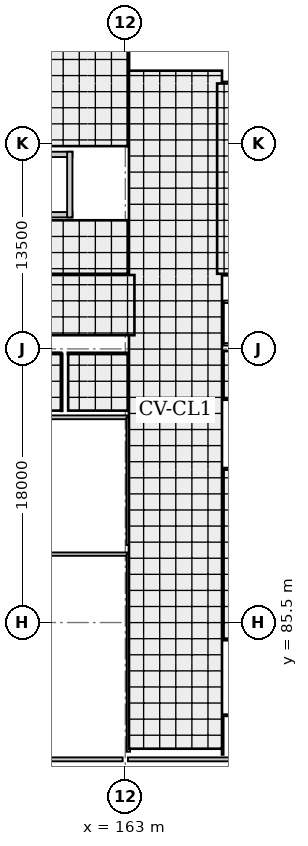
"""IFC4 building model, lengths in metres.
Left out: names, types, materials, properties, quantities, classifications, styles, units other than length and angle.
Written with IfcOpenShell. Run it as: python <this file> out.ifc"""

import sys

from ifc_helpers import new_model, si_unit, direction, frame, frame_2d, origin, origin_2d, place, context, subcontext, project, spatial, rectangle, i_section, extrude, element, fill, save


model = new_model("IFC4")
c1 = context("Model", 3, precision=1e-05, world=origin(), true_north=direction((0.0, 1.0)))
c2 = subcontext(c1, "Body", "Model", "MODEL_VIEW")
j1 = project(units=[si_unit("LENGTHUNIT", "METRE"), si_unit("PLANEANGLEUNIT", "RADIAN")], contexts=[c1])
p1 = place(None, origin())
s1 = spatial("IfcSite", under=j1, at=p1, CompositionType="ELEMENT")
p2 = place(p1, origin())
s2 = spatial("IfcBuilding", under=s1, at=p2, CompositionType="ELEMENT")
p3 = place(p2, frame((0.0, 0.0, 17.6)))
s3 = spatial("IfcBuildingStorey", under=s2, at=p3, CompositionType="ELEMENT", Elevation=17.6)
for number, where, z_axis, x_axis in (
    (1, (163.0, 76.5, 0.0), (0.0, 0.0, 1.0), (1.0, 0.0, 0.0)),
    (2, (163.0, 85.5, 0.0), (0.0, 0.0, 1.0), (1.0, 0.0, 0.0)),
    (3, (163.0, 94.5, 0.0), (0.0, 0.0, 1.0), (1.0, 0.0, 0.0)),
    (4, (163.0, 103.5, 0.0), (0.0, 0.0, 1.0), (1.0, 0.0, 0.0)),
    (5, (163.0, 117.0, 0.0), (0.0, 0.0, 1.0), (1.0, 0.0, 0.0)),
):
    element("IfcColumn", number, at=place(p3, frame(where, z_axis=z_axis, x_axis=x_axis)), inside=s3, PredefinedType="COLUMN", context=c2, shape_type="SweptSolid", body=[
        extrude(i_section(OverallWidth=0.35, OverallDepth=0.35, WebThickness=0.012, FlangeThickness=0.019, FilletRadius=0.02, at=origin_2d()), origin(), (0.0, 0.0, 1.0), 3.2),
    ])
p4 = place(p3, frame((171.825, 76.5, 0.0), z_axis=(0.0, 0.0, 1.0), x_axis=(-1.0, 0.0, 0.0)))
e6 = element("IfcWall", 6, at=p4, inside=s3, PredefinedType="SOLIDWALL", context=c2, shape_type="SweptSolid", body=[
    extrude(rectangle(XDim=8.65, YDim=0.26, at=frame_2d((4.325, 0.0))), origin(), (0.0, 0.0, 1.0), 2.505),
])
p5 = place(p4, frame((3.078, 0.0, 0.0)))
e7 = element("IfcOpeningElement", 7, at=p5, cuts=e6, PredefinedType="OPENING", context=c2, shape_type="SweptSolid", body=[
    extrude(rectangle(XDim=1.4, YDim=2.25, at=frame_2d((0.7, 1.125))), frame((0.0, 0.14, 0.0), z_axis=(0.0, -1.0, 0.0), x_axis=(1.0, 0.0, 0.0)), (0.0, 0.0, 1.0), 0.28),
])
p6 = place(p3, frame((162.825, 76.5, 0.0), z_axis=(0.0, 0.0, 1.0), x_axis=(-1.0, 0.0, 0.0)))
e8 = element("IfcWall", 8, at=p6, inside=s3, PredefinedType="SOLIDWALL", context=c2, shape_type="SweptSolid", body=[
    extrude(rectangle(XDim=8.65, YDim=0.26, at=frame_2d((4.325, 0.0))), origin(), (0.0, 0.0, 1.0), 2.505),
])
p7 = place(p6, frame((3.625, 0.0, 0.75)))
e9 = element("IfcOpeningElement", 9, at=p7, cuts=e8, PredefinedType="OPENING", context=c2, shape_type="SweptSolid", body=[
    extrude(rectangle(XDim=1.4, YDim=1.55, at=frame_2d((0.7, 0.775))), frame((0.0, 0.14, 0.0), z_axis=(0.0, -1.0, 0.0), x_axis=(1.0, 0.0, 0.0)), (0.0, 0.0, 1.0), 0.28),
])
p8 = place(p3, frame((149.025, 112.325, 0.0), z_axis=(0.0, 0.0, 1.0), x_axis=(1.0, 0.0, 0.0)))
e10 = element("IfcWall", 10, at=p8, inside=s3, PredefinedType="SHEAR", context=c2, shape_type="SweptSolid", body=[
    extrude(rectangle(XDim=10.498, YDim=0.35, at=frame_2d((5.249, 0.0))), origin(), (0.0, 0.0, 1.0), 3.02),
])
p9 = place(p8, frame((0.55, 0.0, 0.0)))
e11 = element("IfcOpeningElement", 11, at=p9, cuts=e10, PredefinedType="OPENING", context=c2, shape_type="SweptSolid", body=[
    extrude(rectangle(XDim=1.3, YDim=2.1, at=frame_2d((0.65, 1.05))), frame((0.0, 0.185, 0.0), z_axis=(0.0, -1.0, 0.0), x_axis=(1.0, 0.0, 0.0)), (0.0, 0.0, 1.0), 0.37),
])
p10 = place(p3, frame((159.522, 116.295, 0.0), z_axis=(0.0, 0.0, 1.0), x_axis=(-1.0, 0.0, 0.0)))
e12 = element("IfcWall", 12, at=p10, inside=s3, PredefinedType="SHEAR", context=c2, shape_type="SweptSolid", body=[
    extrude(rectangle(XDim=10.498, YDim=0.35, at=frame_2d((5.249, 0.0))), origin(), (0.0, 0.0, 1.0), 3.02),
])
p11 = place(p3, frame((159.347, 112.15, 0.0), z_axis=(0.0, 0.0, 1.0), x_axis=(0.0, 1.0, 0.0)))
e13 = element("IfcWall", 13, at=p11, inside=s3, PredefinedType="SHEAR", context=c2, shape_type="SweptSolid", body=[
    extrude(rectangle(XDim=4.32, YDim=0.35, at=frame_2d((2.16, 0.0))), origin(), (0.0, 0.0, 1.0), 3.02),
])
p12 = place(p3, frame((154.6, 90.0, 0.0), z_axis=(0.0, 0.0, 1.0), x_axis=(1.0, 0.0, 0.0)))
e14 = element("IfcWall", 14, at=p12, inside=s3, PredefinedType="SOLIDWALL", context=c2, shape_type="SweptSolid", body=[
    extrude(rectangle(XDim=8.6, YDim=0.22, at=frame_2d((4.3, 0.0))), origin(), (0.0, 0.0, 1.0), 2.555),
])
p13 = place(p3, frame((163.2, 90.0, 0.0), z_axis=(0.0, 0.0, 1.0), x_axis=(0.0, -1.0, 0.0)))
e15 = element("IfcWall", 15, at=p13, inside=s3, PredefinedType="SOLIDWALL", context=c2, shape_type="SweptSolid", body=[
    extrude(rectangle(XDim=13.0, YDim=0.22, at=frame_2d((6.5, 0.0))), origin(), (0.0, 0.0, 1.0), 2.505),
])
p14 = place(p13, frame((5.85, 0.0, 0.0)))
e16 = element("IfcOpeningElement", 16, at=p14, cuts=e15, PredefinedType="OPENING", context=c2, shape_type="SweptSolid", body=[
    extrude(rectangle(XDim=1.3, YDim=2.1, at=frame_2d((0.65, 1.05))), frame((0.0, 0.12, 0.0), z_axis=(0.0, -1.0, 0.0), x_axis=(1.0, 0.0, 0.0)), (0.0, 0.0, 1.0), 0.24),
])
p15 = place(p3, frame((154.6, 99.0, 0.0), z_axis=(0.0, 0.0, 1.0), x_axis=(1.0, 0.0, 0.0)))
e17 = element("IfcWall", 17, at=p15, inside=s3, PredefinedType="SOLIDWALL", context=c2, shape_type="SweptSolid", body=[
    extrude(rectangle(XDim=8.6, YDim=0.25, at=frame_2d((4.3, 0.0))), origin(), (0.0, 0.0, 1.0), 2.555),
])
p16 = place(p3, frame((163.2, 99.0, 0.0), z_axis=(0.0, 0.0, 1.0), x_axis=(0.0, -1.0, 0.0)))
e18 = element("IfcWall", 18, at=p16, inside=s3, PredefinedType="SOLIDWALL", context=c2, shape_type="SweptSolid", body=[
    extrude(rectangle(XDim=8.4, YDim=0.25, at=frame_2d((4.2, 0.0))), origin(), (0.0, 0.0, 1.0), 2.505),
])
p17 = place(p16, frame((2.55, 0.0, 0.0)))
e19 = element("IfcOpeningElement", 19, at=p17, cuts=e18, PredefinedType="OPENING", context=c2, shape_type="SweptSolid", body=[
    extrude(rectangle(XDim=1.3, YDim=2.1, at=frame_2d((0.65, 1.05))), frame((0.0, 0.135, 0.0), z_axis=(0.0, -1.0, 0.0), x_axis=(1.0, 0.0, 0.0)), (0.0, 0.0, 1.0), 0.27),
])
p18 = place(p3, frame((163.2, 125.2, 0.0), z_axis=(0.0, 0.0, 1.0), x_axis=(0.0, -1.0, 0.0)))
e20 = element("IfcWall", 20, at=p18, inside=s3, PredefinedType="PARTITIONING", context=c2, shape_type="SweptSolid", body=[
    extrude(rectangle(XDim=8.4, YDim=0.15, at=frame_2d((4.2, 0.0))), origin(), (0.0, 0.0, 1.0), 2.355),
])
p19 = place(p18, frame((3.575, 0.0, 0.0)))
e21 = element("IfcOpeningElement", 21, at=p19, cuts=e20, PredefinedType="OPENING", context=c2, shape_type="SweptSolid", body=[
    extrude(rectangle(XDim=1.25, YDim=2.1, at=frame_2d((0.625, 1.05))), frame((0.0, 0.085, 0.0), z_axis=(0.0, -1.0, 0.0), x_axis=(1.0, 0.0, 0.0)), (0.0, 0.0, 1.0), 0.17),
])
p20 = place(p3, frame((180.8, 100.2, 0.0), z_axis=(0.0, 0.0, 1.0), x_axis=(-1.0, 0.0, 0.0)))
e22 = element("IfcWall", 22, at=p20, inside=s3, PredefinedType="PARTITIONING", context=c2, shape_type="SweptSolid", body=[
    extrude(rectangle(XDim=11.4, YDim=0.14, at=frame_2d((5.7, 0.0))), origin(), (0.0, 0.0, 1.0), 2.565),
])
p21 = place(p3, frame((169.4, 100.2, 0.0), z_axis=(0.0, 0.0, 1.0), x_axis=(0.0, 1.0, 0.0)))
e23 = element("IfcWall", 23, at=p21, inside=s3, PredefinedType="PARTITIONING", context=c2, shape_type="SweptSolid", body=[
    extrude(rectangle(XDim=3.2, YDim=0.14, at=frame_2d((1.6, 0.0))), origin(), (0.0, 0.0, 1.0), 2.515),
])
p22 = place(p21, frame((1.075, 0.0, 0.0)))
e24 = element("IfcOpeningElement", 24, at=p22, cuts=e23, PredefinedType="OPENING", context=c2, shape_type="SweptSolid", body=[
    extrude(rectangle(XDim=1.05, YDim=2.1, at=frame_2d((0.525, 1.05))), frame((0.0, 0.08, 0.0), z_axis=(0.0, -1.0, 0.0), x_axis=(1.0, 0.0, 0.0)), (0.0, 0.0, 1.0), 0.16),
])
p23 = place(p3, frame((163.2, 108.4, 0.0), z_axis=(0.0, 0.0, 1.0), x_axis=(-1.0, 0.0, 0.0)))
e25 = element("IfcWall", 25, at=p23, inside=s3, PredefinedType="PARTITIONING", context=c2, shape_type="SweptSolid", body=[
    extrude(rectangle(XDim=16.6, YDim=0.11, at=frame_2d((8.3, 0.0))), origin(), (0.0, 0.0, 1.0), 2.355),
])
p24 = place(p23, frame((7.725, 0.0, 0.0)))
e26 = element("IfcOpeningElement", 26, at=p24, cuts=e25, PredefinedType="OPENING", context=c2, shape_type="SweptSolid", body=[
    extrude(rectangle(XDim=1.15, YDim=2.1, at=frame_2d((0.575, 1.05))), frame((0.0, 0.065, 0.0), z_axis=(0.0, -1.0, 0.0), x_axis=(1.0, 0.0, 0.0)), (0.0, 0.0, 1.0), 0.13),
])
p25 = place(p3, frame((163.2, 112.0, 0.0), z_axis=(0.0, 0.0, 1.0), x_axis=(0.0, -1.0, 0.0)))
e27 = element("IfcWall", 27, at=p25, inside=s3, PredefinedType="PARTITIONING", context=c2, shape_type="SweptSolid", body=[
    extrude(rectangle(XDim=3.6, YDim=0.11, at=frame_2d((1.8, 0.0))), origin(), (0.0, 0.0, 1.0), 2.355),
])
for number, where, z_axis, x_axis in (
    (28, (173.4, 84.4, 0.0), (0.0, 0.0, 1.0), (-1.0, 0.0, 0.0)),
    (29, (169.4, 95.6, 0.0), (0.0, 0.0, 1.0), (1.0, 0.0, 0.0)),
):
    element("IfcWall", number, at=place(p3, frame(where, z_axis=z_axis, x_axis=x_axis)), inside=s3, PredefinedType="PARTITIONING", context=c2, shape_type="SweptSolid", body=[
        extrude(rectangle(XDim=4.0, YDim=0.175, at=frame_2d((2.0, 0.0))), origin(), (0.0, 0.0, 1.0), 2.565),
    ])
p26 = place(p3, frame((169.4, 84.4, 0.0), z_axis=(0.0, 0.0, 1.0), x_axis=(0.0, 1.0, 0.0)))
e30 = element("IfcWall", 30, at=p26, inside=s3, PredefinedType="PARTITIONING", context=c2, shape_type="SweptSolid", body=[
    extrude(rectangle(XDim=11.2, YDim=0.175, at=frame_2d((5.6, 0.0))), origin(), (0.0, 0.0, 1.0), 2.515),
])
p27 = place(p26, frame((5.075, 0.0, 0.0)))
e31 = element("IfcOpeningElement", 31, at=p27, cuts=e30, PredefinedType="OPENING", context=c2, shape_type="SweptSolid", body=[
    extrude(rectangle(XDim=1.05, YDim=2.1, at=frame_2d((0.525, 1.05))), frame((0.0, 0.097, 0.0), z_axis=(0.0, -1.0, 0.0), x_axis=(1.0, 0.0, 0.0)), (0.0, 0.0, 1.0), 0.195),
])
for number, where, z_axis, x_axis in (
    (32, (173.4, 103.8, 0.0), (0.0, 0.0, 1.0), (-1.0, 0.0, 0.0)),
    (33, (169.4, 106.6, 0.0), (0.0, 0.0, 1.0), (1.0, 0.0, 0.0)),
):
    element("IfcWall", number, at=place(p3, frame(where, z_axis=z_axis, x_axis=x_axis)), inside=s3, PredefinedType="PARTITIONING", context=c2, shape_type="SweptSolid", body=[
        extrude(rectangle(XDim=4.0, YDim=0.16, at=frame_2d((2.0, 0.0))), origin(), (0.0, 0.0, 1.0), 2.355),
    ])
p28 = place(p3, frame((169.4, 103.8, 0.0), z_axis=(0.0, 0.0, 1.0), x_axis=(0.0, 1.0, 0.0)))
e34 = element("IfcWall", 34, at=p28, inside=s3, PredefinedType="PARTITIONING", context=c2, shape_type="SweptSolid", body=[
    extrude(rectangle(XDim=2.8, YDim=0.16, at=frame_2d((1.4, 0.0))), origin(), (0.0, 0.0, 1.0), 2.515),
])
p29 = place(p28, frame((0.875, 0.0, 0.0)))
e35 = element("IfcOpeningElement", 35, at=p29, cuts=e34, PredefinedType="OPENING", context=c2, shape_type="SweptSolid", body=[
    extrude(rectangle(XDim=1.05, YDim=2.1, at=frame_2d((0.525, 1.05))), frame((0.0, 0.09, 0.0), z_axis=(0.0, -1.0, 0.0), x_axis=(1.0, 0.0, 0.0)), (0.0, 0.0, 1.0), 0.18),
])
p30 = place(p3, frame((154.6, 103.2, 0.0), z_axis=(0.0, 0.0, 1.0), x_axis=(1.0, 0.0, 0.0)))
e36 = element("IfcWall", 36, at=p30, inside=s3, PredefinedType="PARTITIONING", context=c2, shape_type="SweptSolid", body=[
    extrude(rectangle(XDim=4.2, YDim=0.15, at=frame_2d((2.1, 0.0))), origin(), (0.0, 0.0, 1.0), 2.505),
])
p31 = place(p30, frame((1.65, 0.0, 0.0)))
e37 = element("IfcOpeningElement", 37, at=p31, cuts=e36, PredefinedType="OPENING", context=c2, shape_type="SweptSolid", body=[
    extrude(rectangle(XDim=0.9, YDim=2.1, at=frame_2d((0.45, 1.05))), frame((0.0, 0.085, 0.0), z_axis=(0.0, -1.0, 0.0), x_axis=(1.0, 0.0, 0.0)), (0.0, 0.0, 1.0), 0.17),
])
p32 = place(p3, frame((158.8, 103.2, 0.0), z_axis=(0.0, 0.0, 1.0), x_axis=(0.0, -1.0, 0.0)))
e38 = element("IfcWall", 38, at=p32, inside=s3, PredefinedType="PARTITIONING", context=c2, shape_type="SweptSolid", body=[
    extrude(rectangle(XDim=3.8, YDim=0.15, at=frame_2d((1.9, 0.0))), origin(), (0.0, 0.0, 1.0), 2.505),
])
p33 = place(p3, frame((159.2, 103.2, 0.0), z_axis=(0.0, 0.0, 1.0), x_axis=(1.0, 0.0, 0.0)))
e39 = element("IfcWall", 39, at=p33, inside=s3, PredefinedType="PARTITIONING", context=c2, shape_type="SweptSolid", body=[
    extrude(rectangle(XDim=4.0, YDim=0.14, at=frame_2d((2.0, 0.0))), origin(), (0.0, 0.0, 1.0), 2.355),
])
p34 = place(p33, frame((1.55, 0.0, 0.0)))
e40 = element("IfcOpeningElement", 40, at=p34, cuts=e39, PredefinedType="OPENING", context=c2, shape_type="SweptSolid", body=[
    extrude(rectangle(XDim=0.9, YDim=2.1, at=frame_2d((0.45, 1.05))), frame((0.0, 0.08, 0.0), z_axis=(0.0, -1.0, 0.0), x_axis=(1.0, 0.0, 0.0)), (0.0, 0.0, 1.0), 0.16),
])
p35 = place(p3, frame((163.2, 103.2, 0.0), z_axis=(0.0, 0.0, 1.0), x_axis=(0.0, -1.0, 0.0)))
e41 = element("IfcWall", 41, at=p35, inside=s3, PredefinedType="PARTITIONING", context=c2, shape_type="SweptSolid", body=[
    extrude(rectangle(XDim=3.8, YDim=0.14, at=frame_2d((1.9, 0.0))), origin(), (0.0, 0.0, 1.0), 2.355),
])
p36 = place(p3, frame((169.4, 79.4, 0.0), z_axis=(0.0, 0.0, 1.0), x_axis=(1.0, 0.0, 0.0)))
e42 = element("IfcWall", 42, at=p36, inside=s3, PredefinedType="PARTITIONING", context=c2, shape_type="SweptSolid", body=[
    extrude(rectangle(XDim=4.0, YDim=0.13, at=frame_2d((2.0, 0.0))), origin(), (0.0, 0.0, 1.0), 2.565),
])
p37 = place(p3, frame((169.4, 76.8, 0.0), z_axis=(0.0, 0.0, 1.0), x_axis=(0.0, 1.0, 0.0)))
e43 = element("IfcWall", 43, at=p37, inside=s3, PredefinedType="PARTITIONING", context=c2, shape_type="SweptSolid", body=[
    extrude(rectangle(XDim=2.6, YDim=0.13, at=frame_2d((1.3, 0.0))), origin(), (0.0, 0.0, 1.0), 2.515),
])
p38 = place(p37, frame((0.79, 0.0, 0.0)))
e44 = element("IfcOpeningElement", 44, at=p38, cuts=e43, PredefinedType="OPENING", context=c2, shape_type="SweptSolid", body=[
    extrude(rectangle(XDim=1.02, YDim=2.05, at=frame_2d((0.51, 1.025))), frame((0.0, 0.075, 0.0), z_axis=(0.0, -1.0, 0.0), x_axis=(1.0, 0.0, 0.0)), (0.0, 0.0, 1.0), 0.15),
])
p39 = place(p3, frame((173.4, 108.4, 0.0), z_axis=(0.0, 0.0, 1.0), x_axis=(-1.0, 0.0, 0.0)))
e45 = element("IfcWall", 45, at=p39, inside=s3, PredefinedType="PARTITIONING", context=c2, shape_type="SweptSolid", body=[
    extrude(rectangle(XDim=4.4, YDim=0.175, at=frame_2d((2.2, 0.0))), origin(), (0.0, 0.0, 1.0), 2.355),
])
p40 = place(p3, frame((169.0, 121.0, 0.0), z_axis=(0.0, 0.0, 1.0), x_axis=(1.0, 0.0, 0.0)))
e46 = element("IfcWall", 46, at=p40, inside=s3, PredefinedType="PARTITIONING", context=c2, shape_type="SweptSolid", body=[
    extrude(rectangle(XDim=4.4, YDim=0.175, at=frame_2d((2.2, 0.0))), origin(), (0.0, 0.0, 1.0), 2.565),
])
p41 = place(p40, frame((1.625, 0.0, 0.0)))
e47 = element("IfcOpeningElement", 47, at=p41, cuts=e46, PredefinedType="OPENING", context=c2, shape_type="SweptSolid", body=[
    extrude(rectangle(XDim=1.15, YDim=2.1, at=frame_2d((0.575, 1.05))), frame((0.0, 0.097, 0.0), z_axis=(0.0, -1.0, 0.0), x_axis=(1.0, 0.0, 0.0)), (0.0, 0.0, 1.0), 0.195),
])
p42 = place(p3, frame((169.0, 108.4, 0.0), z_axis=(0.0, 0.0, 1.0), x_axis=(0.0, 1.0, 0.0)))
e48 = element("IfcWall", 48, at=p42, inside=s3, PredefinedType="PARTITIONING", context=c2, shape_type="SweptSolid", body=[
    extrude(rectangle(XDim=12.6, YDim=0.175, at=frame_2d((6.3, 0.0))), origin(), (0.0, 0.0, 1.0), 2.515),
])
p43 = place(p5, origin())
e49 = element("IfcDoor", 49, at=p43, inside=s3, OperationType="SINGLE_SWING_RIGHT", PredefinedType="DOOR", context=c2, shape_type="SweptSolid", body=[
    extrude(rectangle(XDim=1.4, YDim=2.25, at=frame_2d((0.7, 1.125))), frame((0.0, 0.025, 0.0), z_axis=(0.0, -1.0, 0.0), x_axis=(1.0, 0.0, 0.0)), (0.0, 0.0, 1.0), 0.05),
])
fill(e7, e49)
p44 = place(p7, origin())
e50 = element("IfcWindow", 50, at=p44, inside=s3, PartitioningType="SINGLE_PANEL", PredefinedType="WINDOW", context=c2, shape_type="SweptSolid", body=[
    extrude(rectangle(XDim=1.4, YDim=1.55, at=frame_2d((0.7, 0.775))), frame((0.0, 0.03, 0.0), z_axis=(0.0, -1.0, 0.0), x_axis=(1.0, 0.0, 0.0)), (0.0, 0.0, 1.0), 0.06),
])
fill(e9, e50)
p45 = place(p14, origin())
e51 = element("IfcDoor", 51, at=p45, inside=s3, OperationType="SINGLE_SWING_LEFT", PredefinedType="DOOR", context=c2, shape_type="SweptSolid", body=[
    extrude(rectangle(XDim=1.3, YDim=2.1, at=frame_2d((0.65, 1.05))), frame((0.0, 0.025, 0.0), z_axis=(0.0, -1.0, 0.0), x_axis=(1.0, 0.0, 0.0)), (0.0, 0.0, 1.0), 0.05),
])
fill(e16, e51)
p46 = place(p17, origin())
e52 = element("IfcDoor", 52, at=p46, inside=s3, OperationType="SINGLE_SWING_RIGHT", PredefinedType="DOOR", context=c2, shape_type="SweptSolid", body=[
    extrude(rectangle(XDim=1.3, YDim=2.1, at=frame_2d((0.65, 1.05))), frame((0.0, 0.025, 0.0), z_axis=(0.0, -1.0, 0.0), x_axis=(1.0, 0.0, 0.0)), (0.0, 0.0, 1.0), 0.05),
])
fill(e19, e52)
p47 = place(p19, origin())
e53 = element("IfcDoor", 53, at=p47, inside=s3, OperationType="SINGLE_SWING_LEFT", PredefinedType="DOOR", context=c2, shape_type="SweptSolid", body=[
    extrude(rectangle(XDim=1.25, YDim=2.1, at=frame_2d((0.625, 1.05))), frame((0.0, 0.025, 0.0), z_axis=(0.0, -1.0, 0.0), x_axis=(1.0, 0.0, 0.0)), (0.0, 0.0, 1.0), 0.05),
])
fill(e21, e53)
p48 = place(p22, origin())
e54 = element("IfcDoor", 54, at=p48, inside=s3, OperationType="SINGLE_SWING_RIGHT", PredefinedType="DOOR", context=c2, shape_type="SweptSolid", body=[
    extrude(rectangle(XDim=1.05, YDim=2.1, at=frame_2d((0.525, 1.05))), frame((0.0, 0.025, 0.0), z_axis=(0.0, -1.0, 0.0), x_axis=(1.0, 0.0, 0.0)), (0.0, 0.0, 1.0), 0.05),
])
fill(e24, e54)
p49 = place(p27, origin())
e55 = element("IfcDoor", 55, at=p49, inside=s3, OperationType="SINGLE_SWING_LEFT", PredefinedType="DOOR", context=c2, shape_type="SweptSolid", body=[
    extrude(rectangle(XDim=1.05, YDim=2.1, at=frame_2d((0.525, 1.05))), frame((0.0, 0.025, 0.0), z_axis=(0.0, -1.0, 0.0), x_axis=(1.0, 0.0, 0.0)), (0.0, 0.0, 1.0), 0.05),
])
fill(e31, e55)
p50 = place(p29, origin())
e56 = element("IfcDoor", 56, at=p50, inside=s3, OperationType="SINGLE_SWING_RIGHT", PredefinedType="DOOR", context=c2, shape_type="SweptSolid", body=[
    extrude(rectangle(XDim=1.05, YDim=2.1, at=frame_2d((0.525, 1.05))), frame((0.0, 0.025, 0.0), z_axis=(0.0, -1.0, 0.0), x_axis=(1.0, 0.0, 0.0)), (0.0, 0.0, 1.0), 0.05),
])
fill(e35, e56)
p51 = place(p34, origin())
e57 = element("IfcDoor", 57, at=p51, inside=s3, OperationType="SINGLE_SWING_RIGHT", PredefinedType="DOOR", context=c2, shape_type="SweptSolid", body=[
    extrude(rectangle(XDim=0.9, YDim=2.1, at=frame_2d((0.45, 1.05))), frame((0.0, 0.025, 0.0), z_axis=(0.0, -1.0, 0.0), x_axis=(1.0, 0.0, 0.0)), (0.0, 0.0, 1.0), 0.05),
])
fill(e40, e57)
p52 = place(p38, origin())
e58 = element("IfcDoor", 58, at=p52, inside=s3, OperationType="SINGLE_SWING_LEFT", PredefinedType="DOOR", context=c2, shape_type="SweptSolid", body=[
    extrude(rectangle(XDim=1.02, YDim=2.05, at=frame_2d((0.51, 1.025))), frame((0.0, 0.025, 0.0), z_axis=(0.0, -1.0, 0.0), x_axis=(1.0, 0.0, 0.0)), (0.0, 0.0, 1.0), 0.05),
])
fill(e44, e58)
save(model, sys.argv[1])
